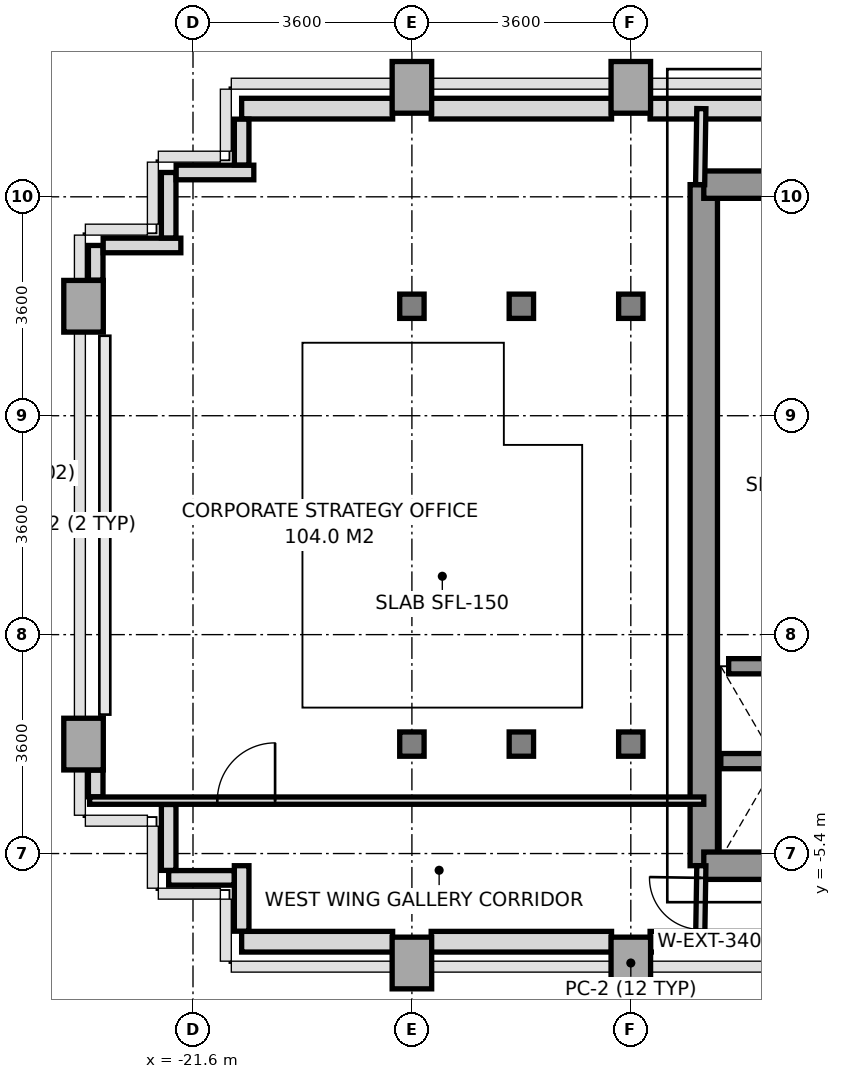
"""IFC4 building model, lengths in metres.
Left out: names, types, materials, properties, quantities, classifications, styles, units other than length and angle.
Written with IfcOpenShell. Run it as: python <this file> out.ifc"""

import sys

from ifc_helpers import new_model, si_unit, direction, frame, frame_2d, origin, origin_2d, place, context, subcontext, project, spatial, rectangle, i_section, extrude, source, transform, mapped, element, fill, save


model = new_model("IFC4")
c1 = context("Model", 3, precision=1e-05, world=origin(), true_north=direction((0.0, 1.0)))
c2 = subcontext(c1, "Body", "Model", "MODEL_VIEW")
j1 = project(units=[si_unit("LENGTHUNIT", "METRE"), si_unit("PLANEANGLEUNIT", "RADIAN")], contexts=[c1])
p1 = place(None, origin())
s1 = spatial("IfcSite", under=j1, at=p1, CompositionType="ELEMENT")
p2 = place(p1, origin())
s2 = spatial("IfcBuilding", under=s1, at=p2, CompositionType="ELEMENT")
p3 = place(p2, frame((0.0, 0.0, 97.2)))
s3 = spatial("IfcBuildingStorey", under=s2, at=p3, CompositionType="ELEMENT", Elevation=97.2)
m1 = source(origin(), c2, "Body", "SweptSolid", [
    extrude(rectangle(XDim=0.65, YDim=0.85, at=origin_2d()), origin(), (0.0, 0.0, 1.0), 3.2),
])
for number, where, z_axis, x_axis in (
    (1, (-23.4, -3.6, 0.0), (0.0, 0.0, 1.0), (1.0, 0.0, 0.0)),
    (2, (-23.4, 3.6, 0.0), (0.0, 0.0, 1.0), (1.0, 0.0, 0.0)),
    (3, (-18.0, -7.2, 0.0), (0.0, 0.0, 1.0), (1.0, 0.0, 0.0)),
):
    element("IfcColumn", number, at=place(p3, frame(where, z_axis=z_axis, x_axis=x_axis)), inside=s3, PredefinedType="COLUMN", context=c2, shape_type="MappedRepresentation", body=[
        mapped(m1, transform((0.0, 0.0, 0.0), x_axis=(1.0, 0.0, 0.0), y_axis=(0.0, 1.0, 0.0), z_axis=(0.0, 0.0, 1.0), scale=1.0)),
    ])
m2 = source(origin(), c2, "Body", "SweptSolid", [
    extrude(i_section(OverallWidth=0.401, OverallDepth=0.399, WebThickness=0.02, FlangeThickness=0.032, at=origin_2d()), origin(), (0.0, 0.0, 1.0), 3.2),
])
for number, where, z_axis, x_axis in (
    (4, (-18.0, -3.6, 0.0), (0.0, 0.0, 1.0), (1.0, 0.0, 0.0)),
    (5, (-18.0, 3.6, 0.0), (0.0, 0.0, 1.0), (1.0, 0.0, 0.0)),
):
    element("IfcColumn", number, at=place(p3, frame(where, z_axis=z_axis, x_axis=x_axis)), inside=s3, PredefinedType="COLUMN", context=c2, shape_type="MappedRepresentation", body=[
        mapped(m2, transform((0.0, 0.0, 0.0), x_axis=(1.0, 0.0, 0.0), y_axis=(0.0, 1.0, 0.0), z_axis=(0.0, 0.0, 1.0), scale=1.0)),
    ])
p4 = place(p3, frame((-18.0, 7.2, 0.0), z_axis=(0.0, 0.0, 1.0), x_axis=(1.0, 0.0, 0.0)))
e6 = element("IfcColumn", 6, at=p4, inside=s3, PredefinedType="COLUMN", context=c2, shape_type="MappedRepresentation", body=[
    mapped(m1, transform((0.0, 0.0, 0.0), x_axis=(1.0, 0.0, 0.0), y_axis=(0.0, 1.0, 0.0), z_axis=(0.0, 0.0, 1.0), scale=1.0)),
])
for number, where, z_axis, x_axis in (
    (7, (-16.2, -3.6, 0.0), (0.0, 0.0, 1.0), (1.0, 0.0, 0.0)),
    (8, (-16.2, 3.6, 0.0), (0.0, 0.0, 1.0), (1.0, 0.0, 0.0)),
):
    element("IfcColumn", number, at=place(p3, frame(where, z_axis=z_axis, x_axis=x_axis)), inside=s3, PredefinedType="COLUMN", context=c2, shape_type="MappedRepresentation", body=[
        mapped(m2, transform((0.0, 0.0, 0.0), x_axis=(1.0, 0.0, 0.0), y_axis=(0.0, 1.0, 0.0), z_axis=(0.0, 0.0, 1.0), scale=1.0)),
    ])
p5 = place(p3, frame((-14.4, -7.2, 0.0), z_axis=(0.0, 0.0, 1.0), x_axis=(1.0, 0.0, 0.0)))
e9 = element("IfcColumn", 9, at=p5, inside=s3, PredefinedType="COLUMN", context=c2, shape_type="MappedRepresentation", body=[
    mapped(m1, transform((0.0, 0.0, 0.0), x_axis=(1.0, 0.0, 0.0), y_axis=(0.0, 1.0, 0.0), z_axis=(0.0, 0.0, 1.0), scale=1.0)),
])
for number, where, z_axis, x_axis in (
    (10, (-14.4, -3.6, 0.0), (0.0, 0.0, 1.0), (1.0, 0.0, 0.0)),
    (11, (-14.4, 3.6, 0.0), (0.0, 0.0, 1.0), (1.0, 0.0, 0.0)),
):
    element("IfcColumn", number, at=place(p3, frame(where, z_axis=z_axis, x_axis=x_axis)), inside=s3, PredefinedType="COLUMN", context=c2, shape_type="MappedRepresentation", body=[
        mapped(m2, transform((0.0, 0.0, 0.0), x_axis=(1.0, 0.0, 0.0), y_axis=(0.0, 1.0, 0.0), z_axis=(0.0, 0.0, 1.0), scale=1.0)),
    ])
p6 = place(p3, frame((-14.4, 7.2, 0.0), z_axis=(0.0, 0.0, 1.0), x_axis=(1.0, 0.0, 0.0)))
e12 = element("IfcColumn", 12, at=p6, inside=s3, PredefinedType="COLUMN", context=c2, shape_type="MappedRepresentation", body=[
    mapped(m1, transform((0.0, 0.0, 0.0), x_axis=(1.0, 0.0, 0.0), y_axis=(0.0, 1.0, 0.0), z_axis=(0.0, 0.0, 1.0), scale=1.0)),
])
p7 = place(p3, frame((-20.8, 6.85, 0.0), z_axis=(0.0, 0.0, 1.0), x_axis=(1.0, 0.0, 0.0)))
e13 = element("IfcWall", 13, at=p7, inside=s3, PredefinedType="SOLIDWALL", context=c2, shape_type="SweptSolid", body=[
    extrude(rectangle(XDim=2.483, YDim=0.34, at=frame_2d((1.242, 0.0))), origin(), (0.0, 0.0, 1.0), 3.2),
])
p8 = place(p3, frame((-17.683, 6.85, 0.0), z_axis=(0.0, 0.0, 1.0), x_axis=(1.0, 0.0, 0.0)))
e14 = element("IfcWall", 14, at=p8, inside=s3, PredefinedType="SOLIDWALL", context=c2, shape_type="SweptSolid", body=[
    extrude(rectangle(XDim=2.966, YDim=0.34, at=frame_2d((1.483, 0.0))), origin(), (0.0, 0.0, 1.0), 2.45),
])
p9 = place(p3, frame((-14.083, 6.85, 0.0), z_axis=(0.0, 0.0, 1.0), x_axis=(1.0, 0.0, 0.0)))
e15 = element("IfcWall", 15, at=p9, inside=s3, PredefinedType="SOLIDWALL", context=c2, shape_type="SweptSolid", body=[
    extrude(rectangle(XDim=2.585, YDim=0.34, at=frame_2d((1.292, 0.0))), origin(), (0.0, 0.0, 1.0), 3.2),
])
p10 = place(p3, frame((-20.8, -6.85, 0.0), z_axis=(0.0, 0.0, 1.0), x_axis=(1.0, 0.0, 0.0)))
e16 = element("IfcWall", 16, at=p10, inside=s3, PredefinedType="SOLIDWALL", context=c2, shape_type="SweptSolid", body=[
    extrude(rectangle(XDim=2.483, YDim=0.34, at=frame_2d((1.242, 0.0))), origin(), (0.0, 0.0, 1.0), 3.2),
])
p11 = place(p3, frame((-17.683, -6.85, 0.0), z_axis=(0.0, 0.0, 1.0), x_axis=(1.0, 0.0, 0.0)))
e17 = element("IfcWall", 17, at=p11, inside=s3, PredefinedType="SOLIDWALL", context=c2, shape_type="SweptSolid", body=[
    extrude(rectangle(XDim=2.966, YDim=0.34, at=frame_2d((1.483, 0.0))), origin(), (0.0, 0.0, 1.0), 2.45),
])
p12 = place(p3, frame((-14.083, -6.85, 0.0), z_axis=(0.0, 0.0, 1.0), x_axis=(1.0, 0.0, 0.0)))
e18 = element("IfcWall", 18, at=p12, inside=s3, PredefinedType="SOLIDWALL", context=c2, shape_type="SweptSolid", body=[
    extrude(rectangle(XDim=2.333, YDim=0.34, at=frame_2d((1.167, 0.0))), origin(), (0.0, 0.0, 1.0), 3.2),
])
for number, where, z_axis, x_axis in (
    (19, (-20.8, -6.677, 0.0), (0.0, 0.0, 1.0), (0.0, 1.0, 0.0)),
    (20, (-20.923, -5.8, 0.0), (0.0, 0.0, 1.0), (-1.0, 0.0, 0.0)),
):
    element("IfcWall", number, at=place(p3, frame(where, z_axis=z_axis, x_axis=x_axis)), inside=s3, PredefinedType="PARAPET", context=c2, shape_type="SweptSolid", body=[
        extrude(rectangle(XDim=1.077, YDim=0.24, at=frame_2d((0.539, 0.0))), origin(), (0.0, 0.0, 1.0), 1.15),
    ])
p13 = place(p3, frame((-22.0, -5.677, 0.0), z_axis=(0.0, 0.0, 1.0), x_axis=(0.0, 1.0, 0.0)))
e21 = element("IfcWall", 21, at=p13, inside=s3, PredefinedType="PARAPET", context=c2, shape_type="SweptSolid", body=[
    extrude(rectangle(XDim=1.084, YDim=0.24, at=frame_2d((0.542, 0.0))), origin(), (0.0, 0.0, 1.0), 1.15),
])
p14 = place(p3, frame((-23.2, -4.467, 0.0), z_axis=(0.0, 0.0, 1.0), x_axis=(0.0, 1.0, 0.0)))
e22 = element("IfcWall", 22, at=p14, inside=s3, PredefinedType="PARAPET", context=c2, shape_type="SweptSolid", body=[
    extrude(rectangle(XDim=0.439, YDim=0.24, at=frame_2d((0.219, 0.0))), origin(), (0.0, 0.0, 1.0), 1.15),
])
p15 = place(p3, frame((-23.2, 4.028, 0.0), z_axis=(0.0, 0.0, 1.0), x_axis=(0.0, 1.0, 0.0)))
e23 = element("IfcWall", 23, at=p15, inside=s3, PredefinedType="PARAPET", context=c2, shape_type="SweptSolid", body=[
    extrude(rectangle(XDim=0.572, YDim=0.24, at=frame_2d((0.286, 0.0))), origin(), (0.0, 0.0, 1.0), 1.15),
])
p16 = place(p3, frame((-23.077, 4.6, 0.0), z_axis=(0.0, 0.0, 1.0), x_axis=(1.0, 0.0, 0.0)))
e24 = element("IfcWall", 24, at=p16, inside=s3, PredefinedType="PARAPET", context=c2, shape_type="SweptSolid", body=[
    extrude(rectangle(XDim=1.277, YDim=0.24, at=frame_2d((0.638, 0.0))), origin(), (0.0, 0.0, 1.0), 1.15),
])
p17 = place(p3, frame((-22.0, 4.723, 0.0), z_axis=(0.0, 0.0, 1.0), x_axis=(0.0, 1.0, 0.0)))
e25 = element("IfcWall", 25, at=p17, inside=s3, PredefinedType="PARAPET", context=c2, shape_type="SweptSolid", body=[
    extrude(rectangle(XDim=1.077, YDim=0.24, at=frame_2d((0.539, 0.0))), origin(), (0.0, 0.0, 1.0), 1.15),
])
p18 = place(p3, frame((-21.877, 5.8, 0.0), z_axis=(0.0, 0.0, 1.0), x_axis=(1.0, 0.0, 0.0)))
e26 = element("IfcWall", 26, at=p18, inside=s3, PredefinedType="PARAPET", context=c2, shape_type="SweptSolid", body=[
    extrude(rectangle(XDim=1.277, YDim=0.24, at=frame_2d((0.638, 0.0))), origin(), (0.0, 0.0, 1.0), 1.15),
])
p19 = place(p3, frame((-20.8, 5.923, 0.0), z_axis=(0.0, 0.0, 1.0), x_axis=(0.0, 1.0, 0.0)))
e27 = element("IfcWall", 27, at=p19, inside=s3, PredefinedType="PARAPET", context=c2, shape_type="SweptSolid", body=[
    extrude(rectangle(XDim=0.754, YDim=0.24, at=frame_2d((0.377, 0.0))), origin(), (0.0, 0.0, 1.0), 1.15),
])
p20 = place(p3, frame((-13.2, -5.6, 0.0), z_axis=(0.0, 0.0, 1.0), x_axis=(0.0, 1.0, 0.0)))
e28 = element("IfcWall", 28, at=p20, inside=s3, PredefinedType="SHEAR", context=c2, shape_type="SweptSolid", body=[
    extrude(rectangle(XDim=11.2, YDim=0.45, at=frame_2d((5.6, 0.0))), origin(), (0.0, 0.0, 1.0), 3.2),
])
p21 = place(p3, frame((-13.2, 5.6, 0.0), z_axis=(0.0, 0.0, 1.0), x_axis=(1.0, 0.0, 0.0)))
e29 = element("IfcWall", 29, at=p21, inside=s3, PredefinedType="SHEAR", context=c2, shape_type="SweptSolid", body=[
    extrude(rectangle(XDim=1.819, YDim=0.45, at=frame_2d((0.909, 0.0))), origin(), (0.0, 0.0, 1.0), 3.2),
])
p22 = place(p3, frame((-13.2, -5.6, 0.0), z_axis=(0.0, 0.0, 1.0), x_axis=(1.0, 0.0, 0.0)))
e30 = element("IfcWall", 30, at=p22, inside=s3, PredefinedType="SHEAR", context=c2, shape_type="SweptSolid", body=[
    extrude(rectangle(XDim=7.8, YDim=0.45, at=frame_2d((3.9, 0.0))), origin(), (0.0, 0.0, 1.0), 3.2),
])
p23 = place(p22, frame((3.6, 0.0, 0.0)))
e31 = element("IfcOpeningElement", 31, at=p23, cuts=e30, PredefinedType="OPENING", context=c2, shape_type="SweptSolid", body=[
    extrude(rectangle(XDim=1.2, YDim=2.2, at=frame_2d((0.6, 1.1))), frame((0.0, 0.235, 0.0), z_axis=(0.0, -1.0, 0.0), x_axis=(1.0, 0.0, 0.0)), (0.0, 0.0, 1.0), 0.47),
])
p24 = place(p3, frame((-12.92, -3.88, 0.0), z_axis=(0.0, 0.0, 1.0), x_axis=(1.0, 0.0, 0.0)))
e32 = element("IfcWall", 32, at=p24, inside=s3, PredefinedType="SOLIDWALL", context=c2, shape_type="SweptSolid", body=[
    extrude(rectangle(XDim=1.84, YDim=0.25, at=frame_2d((0.92, 0.0))), origin(), (0.0, 0.0, 1.0), 3.2),
])
p25 = place(p3, frame((-12.791, -2.32, 0.0), z_axis=(0.0, 0.0, 1.0), x_axis=(1.0, 0.0, 0.0)))
e33 = element("IfcWall", 33, at=p25, inside=s3, PredefinedType="SOLIDWALL", context=c2, shape_type="SweptSolid", body=[
    extrude(rectangle(XDim=1.582, YDim=0.25, at=frame_2d((0.791, 0.0))), origin(), (0.0, 0.0, 1.0), 3.2),
])
p26 = place(p3, frame((-13.26, 5.6, 0.0), z_axis=(0.0, 0.0, 1.0), x_axis=(0.016013571389, 0.999871774545, 0.0)))
e34 = element("IfcWall", 34, at=p26, inside=s3, PredefinedType="PARTITIONING", context=c2, shape_type="SweptSolid", body=[
    extrude(rectangle(XDim=1.25, YDim=0.15, at=frame_2d((0.625, 0.0))), origin(), (0.0, 0.0, 1.0), 3.2),
])
p27 = place(p3, frame((-13.26, -6.85, 0.0), z_axis=(0.0, 0.0, 1.0), x_axis=(0.016013571389, 0.999871774545, 0.0)))
e35 = element("IfcWall", 35, at=p27, inside=s3, PredefinedType="PARTITIONING", context=c2, shape_type="SweptSolid", body=[
    extrude(rectangle(XDim=1.25, YDim=0.15, at=frame_2d((0.625, 0.0))), origin(), (0.0, 0.0, 1.0), 3.2),
])
p28 = place(p27, frame((0.2, 0.0, 0.0)))
e36 = element("IfcOpeningElement", 36, at=p28, cuts=e35, PredefinedType="OPENING", context=c2, shape_type="SweptSolid", body=[
    extrude(rectangle(XDim=0.85, YDim=2.1, at=frame_2d((0.425, 1.05))), frame((0.0, 0.085, 0.0), z_axis=(0.0, -1.0, 0.0), x_axis=(1.0, 0.0, 0.0)), (0.0, 0.0, 1.0), 0.17),
])
p29 = place(p3, frame((-23.3, -4.53, 0.0), z_axis=(0.0, 0.0, 1.0), x_axis=(1.0, 0.0, 0.0)))
e37 = element("IfcWall", 37, at=p29, inside=s3, PredefinedType="PARTITIONING", context=c2, shape_type="SweptSolid", body=[
    extrude(rectangle(XDim=10.1, YDim=0.12, at=frame_2d((5.05, 0.0))), origin(), (0.0, 0.0, 1.0), 2.76),
])
p30 = place(p29, frame((2.1, 0.0, 0.0)))
e38 = element("IfcOpeningElement", 38, at=p30, cuts=e37, PredefinedType="OPENING", context=c2, shape_type="SweptSolid", body=[
    extrude(rectangle(XDim=0.95, YDim=2.15, at=frame_2d((0.475, 1.075))), frame((0.0, 0.07, 0.0), z_axis=(0.0, -1.0, 0.0), x_axis=(1.0, 0.0, 0.0)), (0.0, 0.0, 1.0), 0.14),
])
m3 = source(origin(), c2, "Body", "SweptSolid", [
    extrude(rectangle(XDim=0.85, YDim=2.1, at=frame_2d((0.425, 1.05))), frame((0.0, 0.025, 0.0), z_axis=(0.0, -1.0, 0.0), x_axis=(1.0, 0.0, 0.0)), (0.0, 0.0, 1.0), 0.05),
])
p31 = place(p28, origin())
e39 = element("IfcDoor", 39, at=p31, inside=s3, OperationType="SINGLE_SWING_RIGHT", PredefinedType="DOOR", context=c2, shape_type="MappedRepresentation", body=[
    mapped(m3, transform((0.0, 0.0, 0.0), x_axis=(1.0, 0.0, 0.0), y_axis=(0.0, 1.0, 0.0), z_axis=(0.0, 0.0, 1.0), scale=1.0)),
])
fill(e36, e39)
m4 = source(origin(), c2, "Body", "SweptSolid", [
    extrude(rectangle(XDim=0.95, YDim=2.15, at=frame_2d((0.475, 1.075))), frame((0.0, 0.025, 0.0), z_axis=(0.0, -1.0, 0.0), x_axis=(1.0, 0.0, 0.0)), (0.0, 0.0, 1.0), 0.05),
])
p32 = place(p30, origin())
e40 = element("IfcDoor", 40, at=p32, inside=s3, OperationType="SINGLE_SWING_RIGHT", PredefinedType="DOOR", context=c2, shape_type="MappedRepresentation", body=[
    mapped(m4, transform((0.0, 0.0, 0.0), x_axis=(1.0, 0.0, 0.0), y_axis=(0.0, 1.0, 0.0), z_axis=(0.0, 0.0, 1.0), scale=1.0)),
])
fill(e38, e40)
save(model, sys.argv[1])
